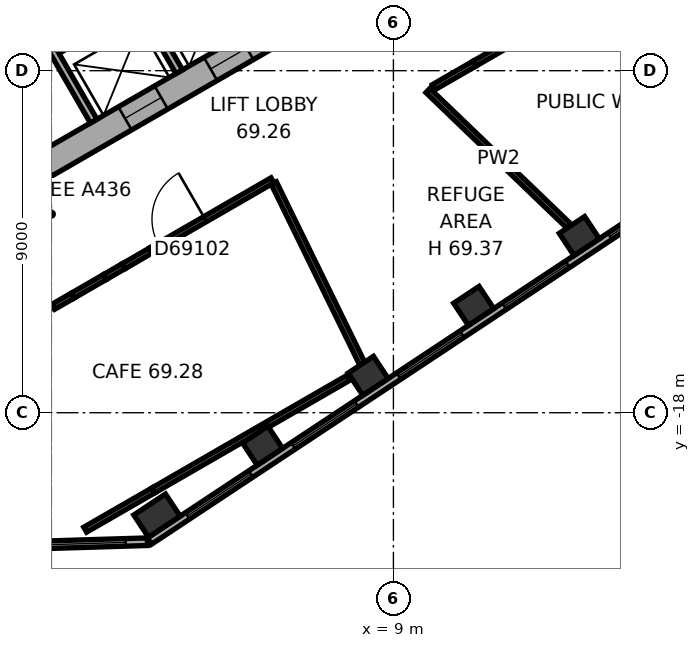
"""IFC4 building model, lengths in metres.
Left out: names, types, materials, properties, quantities, classifications, styles, units other than length and angle.
Written with IfcOpenShell. Run it as: python <this file> out.ifc"""

import sys

from ifc_helpers import new_model, si_unit, direction, frame, frame_2d, origin, origin_2d, place, context, subcontext, project, spatial, rectangle, extrude, element, fill, save


model = new_model("IFC4")
c1 = context("Model", 3, precision=1e-05, world=origin(), true_north=direction((0.0, 1.0)))
c2 = subcontext(c1, "Body", "Model", "MODEL_VIEW")
j1 = project(units=[si_unit("LENGTHUNIT", "METRE"), si_unit("PLANEANGLEUNIT", "RADIAN")], contexts=[c1])
p1 = place(None, origin())
s1 = spatial("IfcSite", under=j1, at=p1, CompositionType="ELEMENT")
p2 = place(p1, origin())
s2 = spatial("IfcBuilding", under=s1, at=p2, CompositionType="ELEMENT")
p3 = place(p2, frame((0.0, 0.0, 278.3)))
s3 = spatial("IfcBuildingStorey", under=s2, at=p3, CompositionType="ELEMENT", Elevation=278.3)
p4 = place(p3, frame((2.778, -20.706, 0.0), z_axis=(0.0, 0.0, 1.0), x_axis=(0.833885822067, 0.551936985312, 0.0)))
e1 = element("IfcColumn", 1, at=p4, inside=s3, PredefinedType="COLUMN", context=c2, shape_type="SweptSolid", body=[
    extrude(rectangle(XDim=1.0, YDim=0.7, at=origin_2d()), origin(), (0.0, 0.0, 1.0), 7.4),
])
for number, where, z_axis, x_axis in (
    (2, (5.557, -18.867, 0.0), (0.0, 0.0, 1.0), (0.834, 0.552, 0.0)),
    (3, (8.335, -17.028, 0.0), (0.0, 0.0, 1.0), (0.834, 0.552, 0.0)),
    (4, (11.113, -15.189, 0.0), (0.0, 0.0, 1.0), (0.834, 0.552, 0.0)),
    (5, (13.891, -13.351, 0.0), (0.0, 0.0, 1.0), (0.834, 0.552, 0.0)),
):
    element("IfcColumn", number, at=place(p3, frame(where, z_axis=z_axis, x_axis=x_axis)), inside=s3, PredefinedType="COLUMN", context=c2, shape_type="SweptSolid", body=[
        extrude(rectangle(XDim=0.8, YDim=0.7, at=origin_2d()), origin(), (0.0, 0.0, 1.0), 7.4),
    ])
p5 = place(p3, frame((-10.025, -5.586, 0.0), z_axis=(0.0, 0.0, 1.0), x_axis=(0.866026453023, -0.499998182661, 0.0)))
e6 = element("IfcWall", 6, at=p5, inside=s3, PredefinedType="SHEAR", context=c2, shape_type="SweptSolid", body=[
    extrude(rectangle(XDim=11.778, YDim=0.7, at=frame_2d((5.889, 0.0))), origin(), (0.0, 0.0, 1.0), 7.4),
])
p6 = place(p5, frame((6.089, 0.0, 0.0)))
e7 = element("IfcOpeningElement", 7, at=p6, cuts=e6, PredefinedType="OPENING", context=c2, shape_type="SweptSolid", body=[
    extrude(rectangle(XDim=1.5, YDim=2.1, at=frame_2d((0.75, 1.05))), frame((0.0, 0.36, 0.0), z_axis=(0.0, -1.0, 0.0), x_axis=(1.0, 0.0, 0.0)), (0.0, 0.0, 1.0), 0.72),
])
p7 = place(p5, frame((1.539, 0.0, 0.0)))
e8 = element("IfcOpeningElement", 8, at=p7, cuts=e6, PredefinedType="OPENING", context=c2, shape_type="SweptSolid", body=[
    extrude(rectangle(XDim=1.1, YDim=2.1, at=frame_2d((0.55, 1.05))), frame((0.0, 0.36, 0.0), z_axis=(0.0, -1.0, 0.0), x_axis=(1.0, 0.0, 0.0)), (0.0, 0.0, 1.0), 0.72),
])
p8 = place(p5, frame((4.139, 0.0, 0.0)))
e9 = element("IfcOpeningElement", 9, at=p8, cuts=e6, PredefinedType="OPENING", context=c2, shape_type="SweptSolid", body=[
    extrude(rectangle(XDim=1.1, YDim=2.1, at=frame_2d((0.55, 1.05))), frame((0.0, 0.36, 0.0), z_axis=(0.0, -1.0, 0.0), x_axis=(1.0, 0.0, 0.0)), (0.0, 0.0, 1.0), 0.72),
])
p9 = place(p3, frame((-0.175, -11.475, 0.0), z_axis=(0.0, 0.0, 1.0), x_axis=(0.866026453023, 0.499998182661, 0.0)))
e10 = element("IfcWall", 10, at=p9, inside=s3, PredefinedType="SHEAR", context=c2, shape_type="SweptSolid", body=[
    extrude(rectangle(XDim=11.778, YDim=0.7, at=frame_2d((5.889, 0.0))), origin(), (0.0, 0.0, 1.0), 7.4),
])
p10 = place(p9, frame((2.439, 0.0, 0.0)))
e11 = element("IfcOpeningElement", 11, at=p10, cuts=e10, PredefinedType="OPENING", context=c2, shape_type="SweptSolid", body=[
    extrude(rectangle(XDim=1.1, YDim=2.1, at=frame_2d((0.55, 1.05))), frame((0.0, 0.36, 0.0), z_axis=(0.0, -1.0, 0.0), x_axis=(1.0, 0.0, 0.0)), (0.0, 0.0, 1.0), 0.72),
])
p11 = place(p9, frame((5.039, 0.0, 0.0)))
e12 = element("IfcOpeningElement", 12, at=p11, cuts=e10, PredefinedType="OPENING", context=c2, shape_type="SweptSolid", body=[
    extrude(rectangle(XDim=1.1, YDim=2.1, at=frame_2d((0.55, 1.05))), frame((0.0, 0.36, 0.0), z_axis=(0.0, -1.0, 0.0), x_axis=(1.0, 0.0, 0.0)), (0.0, 0.0, 1.0), 0.72),
])
p12 = place(p9, frame((7.639, 0.0, 0.0)))
e13 = element("IfcOpeningElement", 13, at=p12, cuts=e10, PredefinedType="OPENING", context=c2, shape_type="SweptSolid", body=[
    extrude(rectangle(XDim=1.1, YDim=2.1, at=frame_2d((0.55, 1.05))), frame((0.0, 0.36, 0.0), z_axis=(0.0, -1.0, 0.0), x_axis=(1.0, 0.0, 0.0)), (0.0, 0.0, 1.0), 0.72),
])
p13 = place(p3, frame((-1.217, -21.508, 0.0), z_axis=(0.0, 0.0, 1.0), x_axis=(0.99953295295, 0.030559384285, 0.0)))
e14 = element("IfcWall", 14, at=p13, inside=s3, PredefinedType="STANDARD", context=c2, shape_type="SweptSolid", body=[
    extrude(rectangle(XDim=3.747, YDim=0.2, at=frame_2d((1.874, 0.0))), origin(), (0.0, 0.0, 1.0), 7.4),
])
p14 = place(p13, frame((0.573, 0.0, 0.8)))
e15 = element("IfcOpeningElement", 15, at=p14, cuts=e14, PredefinedType="OPENING", context=c2, shape_type="SweptSolid", body=[
    extrude(rectangle(XDim=2.6, YDim=4.2, at=frame_2d((1.3, 2.1))), frame((0.0, 0.11, 0.0), z_axis=(0.0, -1.0, 0.0), x_axis=(1.0, 0.0, 0.0)), (0.0, 0.0, 1.0), 0.22),
])
p15 = place(p3, frame((2.58, -21.377, 0.0), z_axis=(0.0, 0.0, 1.0), x_axis=(0.833888592176, 0.551932800112, 0.0)))
e16 = element("IfcWall", 16, at=p15, inside=s3, PredefinedType="STANDARD", context=c2, shape_type="SweptSolid", body=[
    extrude(rectangle(XDim=17.731, YDim=0.2, at=frame_2d((8.866, 0.0))), origin(), (0.0, 0.0, 1.0), 7.4),
])
p16 = place(p15, frame((1.202, 0.0, 0.8)))
e17 = element("IfcOpeningElement", 17, at=p16, cuts=e16, PredefinedType="OPENING", context=c2, shape_type="SweptSolid", body=[
    extrude(rectangle(XDim=2.0, YDim=4.2, at=frame_2d((1.0, 2.1))), frame((0.0, 0.11, 0.0), z_axis=(0.0, -1.0, 0.0), x_axis=(1.0, 0.0, 0.0)), (0.0, 0.0, 1.0), 0.22),
])
p17 = place(p15, frame((4.533, 0.0, 0.8)))
e18 = element("IfcOpeningElement", 18, at=p17, cuts=e16, PredefinedType="OPENING", context=c2, shape_type="SweptSolid", body=[
    extrude(rectangle(XDim=2.0, YDim=4.2, at=frame_2d((1.0, 2.1))), frame((0.0, 0.11, 0.0), z_axis=(0.0, -1.0, 0.0), x_axis=(1.0, 0.0, 0.0)), (0.0, 0.0, 1.0), 0.22),
])
p18 = place(p15, frame((7.865, 0.0, 0.8)))
e19 = element("IfcOpeningElement", 19, at=p18, cuts=e16, PredefinedType="OPENING", context=c2, shape_type="SweptSolid", body=[
    extrude(rectangle(XDim=2.0, YDim=4.2, at=frame_2d((1.0, 2.1))), frame((0.0, 0.11, 0.0), z_axis=(0.0, -1.0, 0.0), x_axis=(1.0, 0.0, 0.0)), (0.0, 0.0, 1.0), 0.22),
])
p19 = place(p15, frame((11.197, 0.0, 0.8)))
e20 = element("IfcOpeningElement", 20, at=p19, cuts=e16, PredefinedType="OPENING", context=c2, shape_type="SweptSolid", body=[
    extrude(rectangle(XDim=2.0, YDim=4.2, at=frame_2d((1.0, 2.1))), frame((0.0, 0.11, 0.0), z_axis=(0.0, -1.0, 0.0), x_axis=(1.0, 0.0, 0.0)), (0.0, 0.0, 1.0), 0.22),
])
p20 = place(p15, frame((14.528, 0.0, 0.8)))
e21 = element("IfcOpeningElement", 21, at=p20, cuts=e16, PredefinedType="OPENING", context=c2, shape_type="SweptSolid", body=[
    extrude(rectangle(XDim=2.0, YDim=4.2, at=frame_2d((1.0, 2.1))), frame((0.0, 0.11, 0.0), z_axis=(0.0, -1.0, 0.0), x_axis=(1.0, 0.0, 0.0)), (0.0, 0.0, 1.0), 0.22),
])
p21 = place(p3, frame((-0.024, -8.559, 0.0), z_axis=(0.0, 0.0, 1.0), x_axis=(0.866026010844, 0.49999894854, 0.0)))
e22 = element("IfcWall", 22, at=p21, inside=s3, PredefinedType="PARTITIONING", context=c2, shape_type="SweptSolid", body=[
    extrude(rectangle(XDim=8.0, YDim=0.2, at=frame_2d((4.0, 0.0))), origin(), (0.0, 0.0, 1.0), 7.12),
])
for number, where, z_axis, x_axis in (
    (23, (0.013, -8.422, 0.0), (0.0, 0.0, 1.0), (0.5, -0.866, 0.0)),
    (24, (2.264, -7.122, 0.0), (0.0, 0.0, 1.0), (0.5, -0.866, 0.0)),
):
    element("IfcWall", number, at=place(p3, frame(where, z_axis=z_axis, x_axis=x_axis)), inside=s3, PredefinedType="PARTITIONING", context=c2, shape_type="SweptSolid", body=[
        extrude(rectangle(XDim=2.2, YDim=0.2, at=frame_2d((1.1, 0.0))), origin(), (0.0, 0.0, 1.0), 7.12),
    ])
p22 = place(p3, frame((2.686, -20.042, 0.0), z_axis=(0.0, 0.0, 1.0), x_axis=(-0.866491264661, -0.499192235784, 0.0)))
e25 = element("IfcWall", 25, at=p22, inside=s3, PredefinedType="PARTITIONING", context=c2, shape_type="SweptSolid", body=[
    extrude(rectangle(XDim=2.073, YDim=0.15, at=frame_2d((1.037, 0.0))), origin(), (0.0, 0.0, 1.0), 7.12),
])
p23 = place(p3, frame((2.689, -20.041, 0.0), z_axis=(0.0, 0.0, 1.0), x_axis=(0.866025885238, 0.499999166098, 0.0)))
e26 = element("IfcWall", 26, at=p23, inside=s3, PredefinedType="PARTITIONING", context=c2, shape_type="SweptSolid", body=[
    extrude(rectangle(XDim=5.932, YDim=0.15, at=frame_2d((2.966, 0.0))), origin(), (0.0, 0.0, 1.0), 7.12),
])
p24 = place(p3, frame((0.052, -15.212, 0.0), z_axis=(0.0, 0.0, 1.0), x_axis=(0.866171626203, 0.499746649774, 0.0)))
e27 = element("IfcWall", 27, at=p24, inside=s3, PredefinedType="PARTITIONING", context=c2, shape_type="SweptSolid", body=[
    extrude(rectangle(XDim=0.582, YDim=0.15, at=frame_2d((0.291, 0.0))), origin(), (0.0, 0.0, 1.0), 7.12),
])
p25 = place(p3, frame((0.556, -14.921, 0.0), z_axis=(0.0, 0.0, 1.0), x_axis=(0.865917507238, 0.500186835751, 0.0)))
e28 = element("IfcWall", 28, at=p25, inside=s3, PredefinedType="PARTITIONING", context=c2, shape_type="SweptSolid", body=[
    extrude(rectangle(XDim=0.986, YDim=0.15, at=frame_2d((0.493, 0.0))), origin(), (0.0, 0.0, 1.0), 7.12),
])
p26 = place(p3, frame((-1.06, -14.631, 0.0), z_axis=(0.0, 0.0, 1.0), x_axis=(0.866172295251, -0.499745490164, 0.0)))
e29 = element("IfcWall", 29, at=p26, inside=s3, PredefinedType="PARTITIONING", context=c2, shape_type="SweptSolid", body=[
    extrude(rectangle(XDim=1.223, YDim=0.15, at=frame_2d((0.612, 0.0))), origin(), (0.0, 0.0, 1.0), 7.12),
])
p27 = place(p3, frame((1.41, -14.428, 0.0), z_axis=(0.0, 0.0, 1.0), x_axis=(0.865940158947, 0.500147619332, 0.0)))
e30 = element("IfcWall", 30, at=p27, inside=s3, PredefinedType="PARTITIONING", context=c2, shape_type="SweptSolid", body=[
    extrude(rectangle(XDim=0.563, YDim=0.15, at=frame_2d((0.282, 0.0))), origin(), (0.0, 0.0, 1.0), 7.12),
])
p28 = place(p3, frame((1.904, -14.145, 0.0), z_axis=(0.0, 0.0, 1.0), x_axis=(0.864830459613, 0.502064015964, 0.0)))
e31 = element("IfcWall", 31, at=p28, inside=s3, PredefinedType="PARTITIONING", context=c2, shape_type="SweptSolid", body=[
    extrude(rectangle(XDim=0.824, YDim=0.15, at=frame_2d((0.412, 0.0))), origin(), (0.0, 0.0, 1.0), 7.12),
])
p29 = place(p3, frame((13.633, -13.102, 0.0), z_axis=(0.0, 0.0, 1.0), x_axis=(-0.721024625755, 0.692909437845, 0.0)))
e32 = element("IfcWall", 32, at=p29, inside=s3, PredefinedType="PARTITIONING", context=c2, shape_type="SweptSolid", body=[
    extrude(rectangle(XDim=5.167, YDim=0.15, at=frame_2d((2.583, 0.0))), origin(), (0.0, 0.0, 1.0), 6.57),
])
p30 = place(p3, frame((5.852, -11.956, 0.0), z_axis=(0.0, 0.0, 1.0), x_axis=(0.439616976251, -0.898185345122, 0.0)))
e33 = element("IfcWall", 33, at=p30, inside=s3, PredefinedType="PARTITIONING", context=c2, shape_type="SweptSolid", body=[
    extrude(rectangle(XDim=5.295, YDim=0.15, at=frame_2d((2.647, 0.0))), origin(), (0.0, 0.0, 1.0), 6.57),
])
p31 = place(p3, frame((5.817, -11.884, 0.0), z_axis=(0.0, 0.0, 1.0), x_axis=(-0.866001804008, -0.500040873783, 0.0)))
e34 = element("IfcWall", 34, at=p31, inside=s3, PredefinedType="PARTITIONING", context=c2, shape_type="SweptSolid", body=[
    extrude(rectangle(XDim=3.695, YDim=0.15, at=frame_2d((1.847, 0.0))), origin(), (0.0, 0.0, 1.0), 7.12),
])
p32 = place(p31, frame((2.044, 0.0, 0.0)))
e35 = element("IfcOpeningElement", 35, at=p32, cuts=e34, PredefinedType="OPENING", context=c2, shape_type="SweptSolid", body=[
    extrude(rectangle(XDim=1.4, YDim=2.4, at=frame_2d((0.7, 1.2))), frame((0.0, 0.085, 0.0), z_axis=(0.0, -1.0, 0.0), x_axis=(1.0, 0.0, 0.0)), (0.0, 0.0, 1.0), 0.17),
])
p33 = place(p3, frame((11.127, -8.817, 0.0), z_axis=(0.0, 0.0, 1.0), x_axis=(-0.866020046725, -0.500009278584, 0.0)))
e36 = element("IfcWall", 36, at=p33, inside=s3, PredefinedType="PARTITIONING", context=c2, shape_type="SweptSolid", body=[
    extrude(rectangle(XDim=1.228, YDim=0.15, at=frame_2d((0.614, 0.0))), origin(), (0.0, 0.0, 1.0), 7.12),
])
p34 = place(p3, frame((11.127, -8.817, 0.0), z_axis=(0.0, 0.0, 1.0), x_axis=(0.866075162418, 0.499913805613, 0.0)))
e37 = element("IfcWall", 37, at=p34, inside=s3, PredefinedType="PARTITIONING", context=c2, shape_type="SweptSolid", body=[
    extrude(rectangle(XDim=2.393, YDim=0.15, at=frame_2d((1.197, 0.0))), origin(), (0.0, 0.0, 1.0), 7.12),
])
p35 = place(p14, origin())
e38 = element("IfcWindow", 38, at=p35, inside=s3, PartitioningType="SINGLE_PANEL", PredefinedType="WINDOW", context=c2, shape_type="SweptSolid", body=[
    extrude(rectangle(XDim=2.6, YDim=4.2, at=frame_2d((1.3, 2.1))), frame((0.0, 0.03, 0.0), z_axis=(0.0, -1.0, 0.0), x_axis=(1.0, 0.0, 0.0)), (0.0, 0.0, 1.0), 0.06),
])
fill(e15, e38)
p36 = place(p16, origin())
e39 = element("IfcWindow", 39, at=p36, inside=s3, PartitioningType="SINGLE_PANEL", PredefinedType="WINDOW", context=c2, shape_type="SweptSolid", body=[
    extrude(rectangle(XDim=2.0, YDim=4.2, at=frame_2d((1.0, 2.1))), frame((0.0, 0.03, 0.0), z_axis=(0.0, -1.0, 0.0), x_axis=(1.0, 0.0, 0.0)), (0.0, 0.0, 1.0), 0.06),
])
fill(e17, e39)
p37 = place(p17, origin())
e40 = element("IfcWindow", 40, at=p37, inside=s3, PartitioningType="SINGLE_PANEL", PredefinedType="WINDOW", context=c2, shape_type="SweptSolid", body=[
    extrude(rectangle(XDim=2.0, YDim=4.2, at=frame_2d((1.0, 2.1))), frame((0.0, 0.03, 0.0), z_axis=(0.0, -1.0, 0.0), x_axis=(1.0, 0.0, 0.0)), (0.0, 0.0, 1.0), 0.06),
])
fill(e18, e40)
p38 = place(p18, origin())
e41 = element("IfcWindow", 41, at=p38, inside=s3, PartitioningType="SINGLE_PANEL", PredefinedType="WINDOW", context=c2, shape_type="SweptSolid", body=[
    extrude(rectangle(XDim=2.0, YDim=4.2, at=frame_2d((1.0, 2.1))), frame((0.0, 0.03, 0.0), z_axis=(0.0, -1.0, 0.0), x_axis=(1.0, 0.0, 0.0)), (0.0, 0.0, 1.0), 0.06),
])
fill(e19, e41)
p39 = place(p19, origin())
e42 = element("IfcWindow", 42, at=p39, inside=s3, PartitioningType="SINGLE_PANEL", PredefinedType="WINDOW", context=c2, shape_type="SweptSolid", body=[
    extrude(rectangle(XDim=2.0, YDim=4.2, at=frame_2d((1.0, 2.1))), frame((0.0, 0.03, 0.0), z_axis=(0.0, -1.0, 0.0), x_axis=(1.0, 0.0, 0.0)), (0.0, 0.0, 1.0), 0.06),
])
fill(e20, e42)
p40 = place(p20, origin())
e43 = element("IfcWindow", 43, at=p40, inside=s3, PartitioningType="SINGLE_PANEL", PredefinedType="WINDOW", context=c2, shape_type="SweptSolid", body=[
    extrude(rectangle(XDim=2.0, YDim=4.2, at=frame_2d((1.0, 2.1))), frame((0.0, 0.03, 0.0), z_axis=(0.0, -1.0, 0.0), x_axis=(1.0, 0.0, 0.0)), (0.0, 0.0, 1.0), 0.06),
])
fill(e21, e43)
p41 = place(p10, origin())
e44 = element("IfcDoor", 44, at=p41, inside=s3, OperationType="DOUBLE_DOOR_SLIDING", PredefinedType="DOOR", context=c2, shape_type="SweptSolid", body=[
    extrude(rectangle(XDim=1.1, YDim=2.1, at=frame_2d((0.55, 1.05))), frame((0.0, 0.025, 0.0), z_axis=(0.0, -1.0, 0.0), x_axis=(1.0, 0.0, 0.0)), (0.0, 0.0, 1.0), 0.05),
])
fill(e11, e44)
p42 = place(p11, origin())
e45 = element("IfcDoor", 45, at=p42, inside=s3, OperationType="DOUBLE_DOOR_SLIDING", PredefinedType="DOOR", context=c2, shape_type="SweptSolid", body=[
    extrude(rectangle(XDim=1.1, YDim=2.1, at=frame_2d((0.55, 1.05))), frame((0.0, 0.025, 0.0), z_axis=(0.0, -1.0, 0.0), x_axis=(1.0, 0.0, 0.0)), (0.0, 0.0, 1.0), 0.05),
])
fill(e12, e45)
p43 = place(p32, origin())
e46 = element("IfcDoor", 46, at=p43, inside=s3, OperationType="SINGLE_SWING_LEFT", PredefinedType="DOOR", context=c2, shape_type="SweptSolid", body=[
    extrude(rectangle(XDim=1.4, YDim=2.4, at=frame_2d((0.7, 1.2))), frame((0.0, 0.025, 0.0), z_axis=(0.0, -1.0, 0.0), x_axis=(1.0, 0.0, 0.0)), (0.0, 0.0, 1.0), 0.05),
])
fill(e35, e46)
save(model, sys.argv[1])
